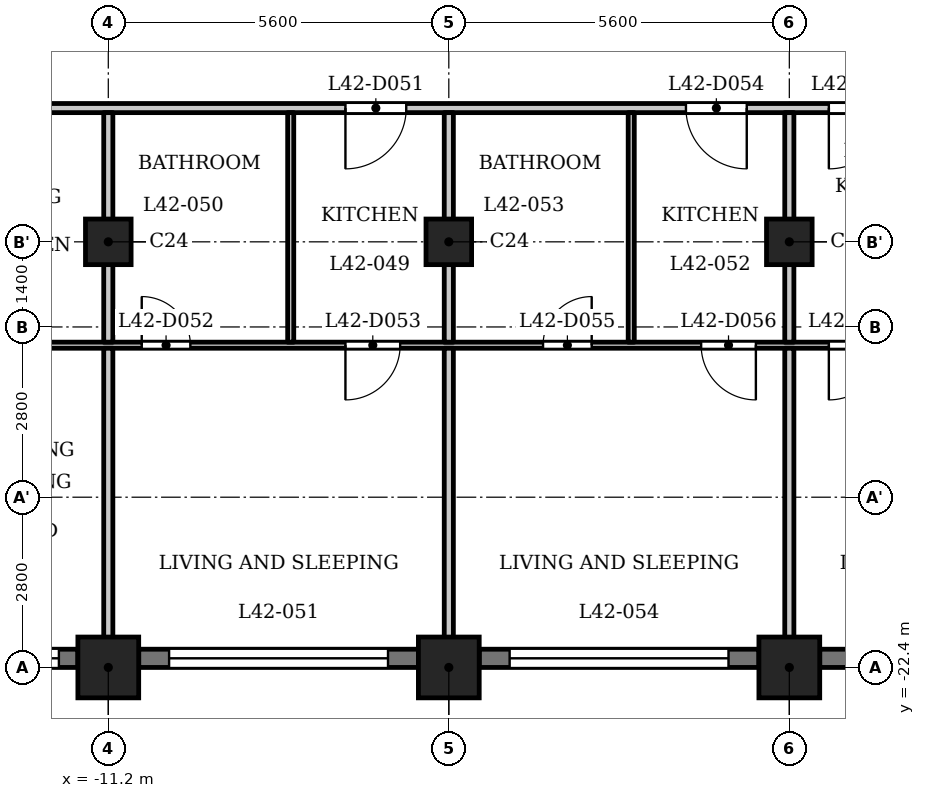
"""IFC4 building model, lengths in metres.
Left out: names, types, materials, properties, quantities, classifications, styles, units other than length and angle.
Written with IfcOpenShell. Run it as: python <this file> out.ifc"""

import sys

from ifc_helpers import new_model, si_unit, direction, frame, frame_2d, origin, origin_2d, place, context, subcontext, project, spatial, rectangle, extrude, element, fill, save


model = new_model("IFC4")
c1 = context("Model", 3, precision=1e-05, world=origin(), true_north=direction((0.0, 1.0)))
c2 = subcontext(c1, "Body", "Model", "MODEL_VIEW")
j1 = project(units=[si_unit("LENGTHUNIT", "METRE"), si_unit("PLANEANGLEUNIT", "RADIAN")], contexts=[c1])
p1 = place(None, origin())
s1 = spatial("IfcSite", under=j1, at=p1, CompositionType="ELEMENT")
p2 = place(p1, origin())
s2 = spatial("IfcBuilding", under=s1, at=p2, CompositionType="ELEMENT")
p3 = place(p2, frame((0.0, 0.0, 164.1)))
s3 = spatial("IfcBuildingStorey", under=s2, at=p3, CompositionType="ELEMENT", Elevation=164.1)
for number, where, z_axis, x_axis in (
    (1, (-11.2, -22.4, 0.0), (0.0, 0.0, 1.0), (1.0, 0.0, 0.0)),
    (2, (-5.6, -22.4, 0.0), (0.0, 0.0, 1.0), (1.0, 0.0, 0.0)),
    (3, (0.0, -22.4, 0.0), (0.0, 0.0, 1.0), (1.0, 0.0, 0.0)),
):
    element("IfcColumn", number, at=place(p3, frame(where, z_axis=z_axis, x_axis=x_axis)), inside=s3, PredefinedType="COLUMN", context=c2, shape_type="SweptSolid", body=[
        extrude(rectangle(XDim=1.0, YDim=1.0, at=origin_2d()), origin(), (0.0, 0.0, 1.0), 3.5),
    ])
for number, where, z_axis, x_axis in (
    (4, (-11.2, -15.4, 0.0), (0.0, 0.0, 1.0), (1.0, 0.0, 0.0)),
    (5, (-5.6, -15.4, 0.0), (0.0, 0.0, 1.0), (1.0, 0.0, 0.0)),
    (6, (0.0, -15.4, 0.0), (0.0, 0.0, 1.0), (1.0, 0.0, 0.0)),
):
    element("IfcColumn", number, at=place(p3, frame(where, z_axis=z_axis, x_axis=x_axis)), inside=s3, PredefinedType="COLUMN", context=c2, shape_type="SweptSolid", body=[
        extrude(rectangle(XDim=0.75, YDim=0.75, at=origin_2d()), origin(), (0.0, 0.0, 1.0), 3.5),
    ])
p4 = place(p3, frame((-16.3, -22.25, 0.0), z_axis=(0.0, 0.0, 1.0), x_axis=(1.0, 0.0, 0.0)))
e7 = element("IfcWall", 7, at=p4, inside=s3, PredefinedType="SOLIDWALL", context=c2, shape_type="SweptSolid", body=[
    extrude(rectangle(XDim=4.6, YDim=0.3, at=frame_2d((2.3, 0.0))), origin(), (0.0, 0.0, 1.0), 2.45),
])
p5 = place(p4, frame((0.413, 0.0, 0.6)))
e8 = element("IfcOpeningElement", 8, at=p5, cuts=e7, PredefinedType="OPENING", context=c2, shape_type="SweptSolid", body=[
    extrude(rectangle(XDim=1.2, YDim=1.55, at=frame_2d((0.6, 0.775))), frame((0.0, 0.16, 0.0), z_axis=(0.0, -1.0, 0.0), x_axis=(1.0, 0.0, 0.0)), (0.0, 0.0, 1.0), 0.32),
])
p6 = place(p4, frame((2.488, 0.0, 0.9)))
e9 = element("IfcOpeningElement", 9, at=p6, cuts=e7, PredefinedType="OPENING", context=c2, shape_type="SweptSolid", body=[
    extrude(rectangle(XDim=1.8, YDim=1.25, at=frame_2d((0.9, 0.625))), frame((0.0, 0.16, 0.0), z_axis=(0.0, -1.0, 0.0), x_axis=(1.0, 0.0, 0.0)), (0.0, 0.0, 1.0), 0.32),
])
p7 = place(p3, frame((-10.7, -22.25, 0.0), z_axis=(0.0, 0.0, 1.0), x_axis=(1.0, 0.0, 0.0)))
e10 = element("IfcWall", 10, at=p7, inside=s3, PredefinedType="SOLIDWALL", context=c2, shape_type="SweptSolid", body=[
    extrude(rectangle(XDim=4.6, YDim=0.3, at=frame_2d((2.3, 0.0))), origin(), (0.0, 0.0, 1.0), 2.45),
])
p8 = place(p7, frame((0.5, 0.0, 1.2)))
e11 = element("IfcOpeningElement", 11, at=p8, cuts=e10, PredefinedType="OPENING", context=c2, shape_type="SweptSolid", body=[
    extrude(rectangle(XDim=3.6, YDim=0.95, at=frame_2d((1.8, 0.475))), frame((0.0, 0.16, 0.0), z_axis=(0.0, -1.0, 0.0), x_axis=(1.0, 0.0, 0.0)), (0.0, 0.0, 1.0), 0.32),
])
p9 = place(p3, frame((-5.1, -22.25, 0.0), z_axis=(0.0, 0.0, 1.0), x_axis=(1.0, 0.0, 0.0)))
e12 = element("IfcWall", 12, at=p9, inside=s3, PredefinedType="SOLIDWALL", context=c2, shape_type="SweptSolid", body=[
    extrude(rectangle(XDim=4.6, YDim=0.3, at=frame_2d((2.3, 0.0))), origin(), (0.0, 0.0, 1.0), 2.45),
])
p10 = place(p9, frame((0.5, 0.0, 1.2)))
e13 = element("IfcOpeningElement", 13, at=p10, cuts=e12, PredefinedType="OPENING", context=c2, shape_type="SweptSolid", body=[
    extrude(rectangle(XDim=3.6, YDim=0.95, at=frame_2d((1.8, 0.475))), frame((0.0, 0.16, 0.0), z_axis=(0.0, -1.0, 0.0), x_axis=(1.0, 0.0, 0.0)), (0.0, 0.0, 1.0), 0.32),
])
p11 = place(p3, frame((0.5, -22.25, 0.0), z_axis=(0.0, 0.0, 1.0), x_axis=(1.0, 0.0, 0.0)))
e14 = element("IfcWall", 14, at=p11, inside=s3, PredefinedType="SOLIDWALL", context=c2, shape_type="SweptSolid", body=[
    extrude(rectangle(XDim=4.6, YDim=0.3, at=frame_2d((2.3, 0.0))), origin(), (0.0, 0.0, 1.0), 2.45),
])
p12 = place(p11, frame((0.5, 0.0, 1.2)))
e15 = element("IfcOpeningElement", 15, at=p12, cuts=e14, PredefinedType="OPENING", context=c2, shape_type="SweptSolid", body=[
    extrude(rectangle(XDim=3.6, YDim=0.95, at=frame_2d((1.8, 0.475))), frame((0.0, 0.16, 0.0), z_axis=(0.0, -1.0, 0.0), x_axis=(1.0, 0.0, 0.0)), (0.0, 0.0, 1.0), 0.32),
])
p13 = place(p3, frame((-16.725, -17.1, 0.0), z_axis=(0.0, 0.0, 1.0), x_axis=(1.0, 0.0, 0.0)))
e16 = element("IfcWall", 16, at=p13, inside=s3, PredefinedType="PARTITIONING", context=c2, shape_type="SweptSolid", body=[
    extrude(rectangle(XDim=33.45, YDim=0.1, at=frame_2d((16.725, 0.0))), origin(), (0.0, 0.0, 1.0), 3.2),
])
p14 = place(p13, frame((0.725, 0.0, 0.0)))
e17 = element("IfcOpeningElement", 17, at=p14, cuts=e16, PredefinedType="OPENING", context=c2, shape_type="SweptSolid", body=[
    extrude(rectangle(XDim=0.8, YDim=2.1, at=frame_2d((0.4, 1.05))), frame((0.0, 0.06, 0.0), z_axis=(0.0, -1.0, 0.0), x_axis=(1.0, 0.0, 0.0)), (0.0, 0.0, 1.0), 0.12),
])
p15 = place(p13, frame((3.175, 0.0, 0.0)))
e18 = element("IfcOpeningElement", 18, at=p15, cuts=e16, PredefinedType="OPENING", context=c2, shape_type="SweptSolid", body=[
    extrude(rectangle(XDim=0.9, YDim=2.1, at=frame_2d((0.45, 1.05))), frame((0.0, 0.06, 0.0), z_axis=(0.0, -1.0, 0.0), x_axis=(1.0, 0.0, 0.0)), (0.0, 0.0, 1.0), 0.12),
])
p16 = place(p13, frame((6.075, 0.0, 0.0)))
e19 = element("IfcOpeningElement", 19, at=p16, cuts=e16, PredefinedType="OPENING", context=c2, shape_type="SweptSolid", body=[
    extrude(rectangle(XDim=0.8, YDim=2.1, at=frame_2d((0.4, 1.05))), frame((0.0, 0.06, 0.0), z_axis=(0.0, -1.0, 0.0), x_axis=(1.0, 0.0, 0.0)), (0.0, 0.0, 1.0), 0.12),
])
p17 = place(p13, frame((9.425, 0.0, 0.0)))
e20 = element("IfcOpeningElement", 20, at=p17, cuts=e16, PredefinedType="OPENING", context=c2, shape_type="SweptSolid", body=[
    extrude(rectangle(XDim=0.9, YDim=2.1, at=frame_2d((0.45, 1.05))), frame((0.0, 0.06, 0.0), z_axis=(0.0, -1.0, 0.0), x_axis=(1.0, 0.0, 0.0)), (0.0, 0.0, 1.0), 0.12),
])
p18 = place(p13, frame((12.675, 0.0, 0.0)))
e21 = element("IfcOpeningElement", 21, at=p18, cuts=e16, PredefinedType="OPENING", context=c2, shape_type="SweptSolid", body=[
    extrude(rectangle(XDim=0.8, YDim=2.1, at=frame_2d((0.4, 1.05))), frame((0.0, 0.06, 0.0), z_axis=(0.0, -1.0, 0.0), x_axis=(1.0, 0.0, 0.0)), (0.0, 0.0, 1.0), 0.12),
])
p19 = place(p13, frame((15.275, 0.0, 0.0)))
e22 = element("IfcOpeningElement", 22, at=p19, cuts=e16, PredefinedType="OPENING", context=c2, shape_type="SweptSolid", body=[
    extrude(rectangle(XDim=0.9, YDim=2.1, at=frame_2d((0.45, 1.05))), frame((0.0, 0.06, 0.0), z_axis=(0.0, -1.0, 0.0), x_axis=(1.0, 0.0, 0.0)), (0.0, 0.0, 1.0), 0.12),
])
p20 = place(p13, frame((20.625, 0.0, 0.0)))
e23 = element("IfcOpeningElement", 23, at=p20, cuts=e16, PredefinedType="OPENING", context=c2, shape_type="SweptSolid", body=[
    extrude(rectangle(XDim=0.8, YDim=2.1, at=frame_2d((0.4, 1.05))), frame((0.0, 0.06, 0.0), z_axis=(0.0, -1.0, 0.0), x_axis=(1.0, 0.0, 0.0)), (0.0, 0.0, 1.0), 0.12),
])
p21 = place(p13, frame((17.375, 0.0, 0.0)))
e24 = element("IfcOpeningElement", 24, at=p21, cuts=e16, PredefinedType="OPENING", context=c2, shape_type="SweptSolid", body=[
    extrude(rectangle(XDim=0.9, YDim=2.1, at=frame_2d((0.45, 1.05))), frame((0.0, 0.06, 0.0), z_axis=(0.0, -1.0, 0.0), x_axis=(1.0, 0.0, 0.0)), (0.0, 0.0, 1.0), 0.12),
])
p22 = place(p13, frame((31.075, 0.0, 0.0)))
e25 = element("IfcOpeningElement", 25, at=p22, cuts=e16, PredefinedType="OPENING", context=c2, shape_type="SweptSolid", body=[
    extrude(rectangle(XDim=0.8, YDim=2.1, at=frame_2d((0.4, 1.05))), frame((0.0, 0.06, 0.0), z_axis=(0.0, -1.0, 0.0), x_axis=(1.0, 0.0, 0.0)), (0.0, 0.0, 1.0), 0.12),
])
p23 = place(p13, frame((29.325, 0.0, 0.0)))
e26 = element("IfcOpeningElement", 26, at=p23, cuts=e16, PredefinedType="OPENING", context=c2, shape_type="SweptSolid", body=[
    extrude(rectangle(XDim=0.9, YDim=2.1, at=frame_2d((0.45, 1.05))), frame((0.0, 0.06, 0.0), z_axis=(0.0, -1.0, 0.0), x_axis=(1.0, 0.0, 0.0)), (0.0, 0.0, 1.0), 0.12),
])
p24 = place(p13, frame((23.725, 0.0, 0.0)))
e27 = element("IfcOpeningElement", 27, at=p24, cuts=e16, PredefinedType="OPENING", context=c2, shape_type="SweptSolid", body=[
    extrude(rectangle(XDim=0.9, YDim=2.1, at=frame_2d((0.45, 1.05))), frame((0.0, 0.06, 0.0), z_axis=(0.0, -1.0, 0.0), x_axis=(1.0, 0.0, 0.0)), (0.0, 0.0, 1.0), 0.12),
])
p25 = place(p13, frame((25.775, 0.0, 0.0)))
e28 = element("IfcOpeningElement", 28, at=p25, cuts=e16, PredefinedType="OPENING", context=c2, shape_type="SweptSolid", body=[
    extrude(rectangle(XDim=0.9, YDim=2.1, at=frame_2d((0.45, 1.05))), frame((0.0, 0.06, 0.0), z_axis=(0.0, -1.0, 0.0), x_axis=(1.0, 0.0, 0.0)), (0.0, 0.0, 1.0), 0.12),
])
p26 = place(p3, frame((-17.4, -13.2, 0.0), z_axis=(0.0, 0.0, 1.0), x_axis=(1.0, 0.0, 0.0)))
e29 = element("IfcWall", 29, at=p26, inside=s3, PredefinedType="PARTITIONING", context=c2, shape_type="SweptSolid", body=[
    extrude(rectangle(XDim=34.8, YDim=0.15, at=frame_2d((17.4, 0.0))), origin(), (0.0, 0.0, 1.0), 3.2),
])
p27 = place(p26, frame((0.15, 0.0, 0.0)))
e30 = element("IfcOpeningElement", 30, at=p27, cuts=e29, PredefinedType="OPENING", context=c2, shape_type="SweptSolid", body=[
    extrude(rectangle(XDim=1.0, YDim=2.1, at=frame_2d((0.5, 1.05))), frame((0.0, 0.085, 0.0), z_axis=(0.0, -1.0, 0.0), x_axis=(1.0, 0.0, 0.0)), (0.0, 0.0, 1.0), 0.17),
])
p28 = place(p26, frame((33.55, 0.0, 0.0)))
e31 = element("IfcOpeningElement", 31, at=p28, cuts=e29, PredefinedType="OPENING", context=c2, shape_type="SweptSolid", body=[
    extrude(rectangle(XDim=1.0, YDim=2.1, at=frame_2d((0.5, 1.05))), frame((0.0, 0.085, 0.0), z_axis=(0.0, -1.0, 0.0), x_axis=(1.0, 0.0, 0.0)), (0.0, 0.0, 1.0), 0.17),
])
p29 = place(p26, frame((3.5, 0.0, 0.0)))
e32 = element("IfcOpeningElement", 32, at=p29, cuts=e29, PredefinedType="OPENING", context=c2, shape_type="SweptSolid", body=[
    extrude(rectangle(XDim=1.0, YDim=2.1, at=frame_2d((0.5, 1.05))), frame((0.0, 0.085, 0.0), z_axis=(0.0, -1.0, 0.0), x_axis=(1.0, 0.0, 0.0)), (0.0, 0.0, 1.0), 0.17),
])
p30 = place(p26, frame((10.1, 0.0, 0.0)))
e33 = element("IfcOpeningElement", 33, at=p30, cuts=e29, PredefinedType="OPENING", context=c2, shape_type="SweptSolid", body=[
    extrude(rectangle(XDim=1.0, YDim=2.1, at=frame_2d((0.5, 1.05))), frame((0.0, 0.085, 0.0), z_axis=(0.0, -1.0, 0.0), x_axis=(1.0, 0.0, 0.0)), (0.0, 0.0, 1.0), 0.17),
])
p31 = place(p26, frame((15.7, 0.0, 0.0)))
e34 = element("IfcOpeningElement", 34, at=p31, cuts=e29, PredefinedType="OPENING", context=c2, shape_type="SweptSolid", body=[
    extrude(rectangle(XDim=1.0, YDim=2.1, at=frame_2d((0.5, 1.05))), frame((0.0, 0.085, 0.0), z_axis=(0.0, -1.0, 0.0), x_axis=(1.0, 0.0, 0.0)), (0.0, 0.0, 1.0), 0.17),
])
p32 = place(p26, frame((18.05, 0.0, 0.0)))
e35 = element("IfcOpeningElement", 35, at=p32, cuts=e29, PredefinedType="OPENING", context=c2, shape_type="SweptSolid", body=[
    extrude(rectangle(XDim=1.0, YDim=2.1, at=frame_2d((0.5, 1.05))), frame((0.0, 0.085, 0.0), z_axis=(0.0, -1.0, 0.0), x_axis=(1.0, 0.0, 0.0)), (0.0, 0.0, 1.0), 0.17),
])
p33 = place(p26, frame((26.9, 0.0, 0.0)))
e36 = element("IfcOpeningElement", 36, at=p33, cuts=e29, PredefinedType="OPENING", context=c2, shape_type="SweptSolid", body=[
    extrude(rectangle(XDim=1.0, YDim=2.1, at=frame_2d((0.5, 1.05))), frame((0.0, 0.085, 0.0), z_axis=(0.0, -1.0, 0.0), x_axis=(1.0, 0.0, 0.0)), (0.0, 0.0, 1.0), 0.17),
])
p34 = place(p3, frame((-11.2, -22.88, 0.0), z_axis=(0.0, 0.0, 1.0), x_axis=(0.0, 1.0, 0.0)))
e37 = element("IfcWall", 37, at=p34, inside=s3, PredefinedType="PARTITIONING", context=c2, shape_type="SweptSolid", body=[
    extrude(rectangle(XDim=5.73, YDim=0.15, at=frame_2d((2.865, 0.0))), origin(), (0.0, 0.0, 1.0), 3.2),
])
p35 = place(p3, frame((-11.2, -17.05, 0.0), z_axis=(0.0, 0.0, 1.0), x_axis=(0.0, 1.0, 0.0)))
e38 = element("IfcWall", 38, at=p35, inside=s3, PredefinedType="PARTITIONING", context=c2, shape_type="SweptSolid", body=[
    extrude(rectangle(XDim=3.775, YDim=0.15, at=frame_2d((1.888, 0.0))), origin(), (0.0, 0.0, 1.0), 3.2),
])
p36 = place(p3, frame((-8.2, -17.05, 0.0), z_axis=(0.0, 0.0, 1.0), x_axis=(0.0, 1.0, 0.0)))
e39 = element("IfcWall", 39, at=p36, inside=s3, PredefinedType="PARTITIONING", context=c2, shape_type="SweptSolid", body=[
    extrude(rectangle(XDim=3.775, YDim=0.1, at=frame_2d((1.888, 0.0))), origin(), (0.0, 0.0, 1.0), 3.2),
])
p37 = place(p3, frame((-5.6, -22.88, 0.0), z_axis=(0.0, 0.0, 1.0), x_axis=(0.0, 1.0, 0.0)))
e40 = element("IfcWall", 40, at=p37, inside=s3, PredefinedType="PARTITIONING", context=c2, shape_type="SweptSolid", body=[
    extrude(rectangle(XDim=5.73, YDim=0.15, at=frame_2d((2.865, 0.0))), origin(), (0.0, 0.0, 1.0), 3.2),
])
p38 = place(p3, frame((-5.6, -17.05, 0.0), z_axis=(0.0, 0.0, 1.0), x_axis=(0.0, 1.0, 0.0)))
e41 = element("IfcWall", 41, at=p38, inside=s3, PredefinedType="PARTITIONING", context=c2, shape_type="SweptSolid", body=[
    extrude(rectangle(XDim=3.775, YDim=0.15, at=frame_2d((1.888, 0.0))), origin(), (0.0, 0.0, 1.0), 3.2),
])
p39 = place(p3, frame((-2.6, -17.05, 0.0), z_axis=(0.0, 0.0, 1.0), x_axis=(0.0, 1.0, 0.0)))
e42 = element("IfcWall", 42, at=p39, inside=s3, PredefinedType="PARTITIONING", context=c2, shape_type="SweptSolid", body=[
    extrude(rectangle(XDim=3.775, YDim=0.1, at=frame_2d((1.888, 0.0))), origin(), (0.0, 0.0, 1.0), 3.2),
])
p40 = place(p3, frame((0.0, -22.88, 0.0), z_axis=(0.0, 0.0, 1.0), x_axis=(0.0, 1.0, 0.0)))
e43 = element("IfcWall", 43, at=p40, inside=s3, PredefinedType="PARTITIONING", context=c2, shape_type="SweptSolid", body=[
    extrude(rectangle(XDim=5.73, YDim=0.15, at=frame_2d((2.865, 0.0))), origin(), (0.0, 0.0, 1.0), 3.2),
])
p41 = place(p3, frame((0.0, -17.05, 0.0), z_axis=(0.0, 0.0, 1.0), x_axis=(0.0, 1.0, 0.0)))
e44 = element("IfcWall", 44, at=p41, inside=s3, PredefinedType="PARTITIONING", context=c2, shape_type="SweptSolid", body=[
    extrude(rectangle(XDim=3.775, YDim=0.15, at=frame_2d((1.888, 0.0))), origin(), (0.0, 0.0, 1.0), 3.2),
])
p42 = place(p30, origin())
e45 = element("IfcDoor", 45, at=p42, inside=s3, OperationType="SINGLE_SWING_LEFT", PredefinedType="DOOR", context=c2, shape_type="SweptSolid", body=[
    extrude(rectangle(XDim=1.0, YDim=2.1, at=frame_2d((0.5, 1.05))), frame((0.0, 0.025, 0.0), z_axis=(0.0, -1.0, 0.0), x_axis=(1.0, 0.0, 0.0)), (0.0, 0.0, 1.0), 0.05),
])
fill(e33, e45)
p43 = place(p16, origin())
e46 = element("IfcDoor", 46, at=p43, inside=s3, OperationType="SINGLE_SWING_RIGHT", PredefinedType="DOOR", context=c2, shape_type="SweptSolid", body=[
    extrude(rectangle(XDim=0.8, YDim=2.1, at=frame_2d((0.4, 1.05))), frame((0.0, 0.025, 0.0), z_axis=(0.0, -1.0, 0.0), x_axis=(1.0, 0.0, 0.0)), (0.0, 0.0, 1.0), 0.05),
])
fill(e19, e46)
p44 = place(p17, origin())
e47 = element("IfcDoor", 47, at=p44, inside=s3, OperationType="SINGLE_SWING_LEFT", PredefinedType="DOOR", context=c2, shape_type="SweptSolid", body=[
    extrude(rectangle(XDim=0.9, YDim=2.1, at=frame_2d((0.45, 1.05))), frame((0.0, 0.025, 0.0), z_axis=(0.0, -1.0, 0.0), x_axis=(1.0, 0.0, 0.0)), (0.0, 0.0, 1.0), 0.05),
])
fill(e20, e47)
p45 = place(p31, origin())
e48 = element("IfcDoor", 48, at=p45, inside=s3, OperationType="SINGLE_SWING_RIGHT", PredefinedType="DOOR", context=c2, shape_type="SweptSolid", body=[
    extrude(rectangle(XDim=1.0, YDim=2.1, at=frame_2d((0.5, 1.05))), frame((0.0, 0.025, 0.0), z_axis=(0.0, -1.0, 0.0), x_axis=(1.0, 0.0, 0.0)), (0.0, 0.0, 1.0), 0.05),
])
fill(e34, e48)
p46 = place(p18, origin())
e49 = element("IfcDoor", 49, at=p46, inside=s3, OperationType="SINGLE_SWING_LEFT", PredefinedType="DOOR", context=c2, shape_type="SweptSolid", body=[
    extrude(rectangle(XDim=0.8, YDim=2.1, at=frame_2d((0.4, 1.05))), frame((0.0, 0.025, 0.0), z_axis=(0.0, -1.0, 0.0), x_axis=(1.0, 0.0, 0.0)), (0.0, 0.0, 1.0), 0.05),
])
fill(e21, e49)
p47 = place(p19, origin())
e50 = element("IfcDoor", 50, at=p47, inside=s3, OperationType="SINGLE_SWING_RIGHT", PredefinedType="DOOR", context=c2, shape_type="SweptSolid", body=[
    extrude(rectangle(XDim=0.9, YDim=2.1, at=frame_2d((0.45, 1.05))), frame((0.0, 0.025, 0.0), z_axis=(0.0, -1.0, 0.0), x_axis=(1.0, 0.0, 0.0)), (0.0, 0.0, 1.0), 0.05),
])
fill(e22, e50)
p48 = place(p32, origin())
e51 = element("IfcDoor", 51, at=p48, inside=s3, OperationType="SINGLE_SWING_LEFT", PredefinedType="DOOR", context=c2, shape_type="SweptSolid", body=[
    extrude(rectangle(XDim=1.0, YDim=2.1, at=frame_2d((0.5, 1.05))), frame((0.0, 0.025, 0.0), z_axis=(0.0, -1.0, 0.0), x_axis=(1.0, 0.0, 0.0)), (0.0, 0.0, 1.0), 0.05),
])
fill(e35, e51)
p49 = place(p21, origin())
e52 = element("IfcDoor", 52, at=p49, inside=s3, OperationType="SINGLE_SWING_LEFT", PredefinedType="DOOR", context=c2, shape_type="SweptSolid", body=[
    extrude(rectangle(XDim=0.9, YDim=2.1, at=frame_2d((0.45, 1.05))), frame((0.0, 0.025, 0.0), z_axis=(0.0, -1.0, 0.0), x_axis=(1.0, 0.0, 0.0)), (0.0, 0.0, 1.0), 0.05),
])
fill(e24, e52)
p50 = place(p6, origin())
e53 = element("IfcWindow", 53, at=p50, inside=s3, PartitioningType="SINGLE_PANEL", PredefinedType="WINDOW", context=c2, shape_type="SweptSolid", body=[
    extrude(rectangle(XDim=1.8, YDim=1.25, at=frame_2d((0.9, 0.625))), frame((0.0, 0.03, 0.0), z_axis=(0.0, -1.0, 0.0), x_axis=(1.0, 0.0, 0.0)), (0.0, 0.0, 1.0), 0.06),
])
fill(e9, e53)
p51 = place(p8, origin())
e54 = element("IfcWindow", 54, at=p51, inside=s3, PartitioningType="SINGLE_PANEL", PredefinedType="WINDOW", context=c2, shape_type="SweptSolid", body=[
    extrude(rectangle(XDim=3.6, YDim=0.95, at=frame_2d((1.8, 0.475))), frame((0.0, 0.03, 0.0), z_axis=(0.0, -1.0, 0.0), x_axis=(1.0, 0.0, 0.0)), (0.0, 0.0, 1.0), 0.06),
])
fill(e11, e54)
p52 = place(p10, origin())
e55 = element("IfcWindow", 55, at=p52, inside=s3, PartitioningType="SINGLE_PANEL", PredefinedType="WINDOW", context=c2, shape_type="SweptSolid", body=[
    extrude(rectangle(XDim=3.6, YDim=0.95, at=frame_2d((1.8, 0.475))), frame((0.0, 0.03, 0.0), z_axis=(0.0, -1.0, 0.0), x_axis=(1.0, 0.0, 0.0)), (0.0, 0.0, 1.0), 0.06),
])
fill(e13, e55)
save(model, sys.argv[1])
